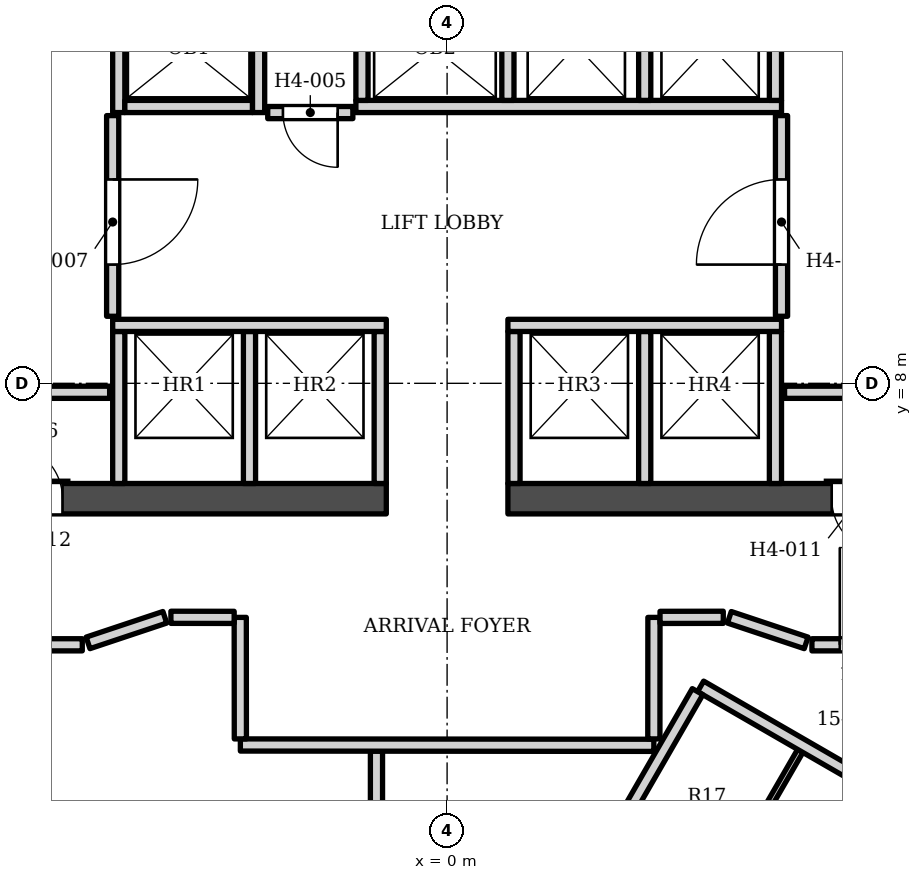
"""IFC4 building model, lengths in metres.
Left out: names, types, materials, properties, quantities, classifications, styles, units other than length and angle.
Written with IfcOpenShell. Run it as: python <this file> out.ifc"""

import sys

from ifc_helpers import new_model, si_unit, direction, frame, frame_2d, origin, place, context, subcontext, project, spatial, rectangle, extrude, element, fill, save


model = new_model("IFC4")
c1 = context("Model", 3, precision=1e-05, world=origin(), true_north=direction((0.0, 1.0)))
c2 = subcontext(c1, "Body", "Model", "MODEL_VIEW")
j1 = project(units=[si_unit("LENGTHUNIT", "METRE"), si_unit("PLANEANGLEUNIT", "RADIAN")], contexts=[c1])
p1 = place(None, origin())
s1 = spatial("IfcSite", under=j1, at=p1, CompositionType="ELEMENT")
p2 = place(p1, origin())
s2 = spatial("IfcBuilding", under=s1, at=p2, CompositionType="ELEMENT")
p3 = place(p2, frame((0.0, 0.0, 76.6)))
s3 = spatial("IfcBuildingStorey", under=s2, at=p3, CompositionType="ELEMENT", Elevation=76.6)
p4 = place(p3, frame((-8.05, 6.103, 0.0), z_axis=(0.0, 0.0, 1.0), x_axis=(1.0, 0.0, 0.0)))
e1 = element("IfcWall", 1, at=p4, inside=s3, PredefinedType="SHEAR", context=c2, shape_type="SweptSolid", body=[
    extrude(rectangle(XDim=7.05, YDim=0.5, at=frame_2d((3.525, 0.0))), origin(), (0.0, 0.0, 1.0), 3.4),
])
p5 = place(p4, frame((0.825, 0.0, 0.0)))
e2 = element("IfcOpeningElement", 2, at=p5, cuts=e1, PredefinedType="OPENING", context=c2, shape_type="SweptSolid", body=[
    extrude(rectangle(XDim=0.9, YDim=2.1, at=frame_2d((0.45, 1.05))), frame((0.0, 0.26, 0.0), z_axis=(0.0, -1.0, 0.0), x_axis=(1.0, 0.0, 0.0)), (0.0, 0.0, 1.0), 0.52),
])
p6 = place(p3, frame((1.0, 6.103, 0.0), z_axis=(0.0, 0.0, 1.0), x_axis=(1.0, 0.0, 0.0)))
e3 = element("IfcWall", 3, at=p6, inside=s3, PredefinedType="SHEAR", context=c2, shape_type="SweptSolid", body=[
    extrude(rectangle(XDim=7.05, YDim=0.5, at=frame_2d((3.525, 0.0))), origin(), (0.0, 0.0, 1.0), 3.4),
])
p7 = place(p6, frame((5.325, 0.0, 0.0)))
e4 = element("IfcOpeningElement", 4, at=p7, cuts=e3, PredefinedType="OPENING", context=c2, shape_type="SweptSolid", body=[
    extrude(rectangle(XDim=0.9, YDim=2.1, at=frame_2d((0.45, 1.05))), frame((0.0, 0.26, 0.0), z_axis=(0.0, -1.0, 0.0), x_axis=(1.0, 0.0, 0.0)), (0.0, 0.0, 1.0), 0.52),
])
for number, where, z_axis, x_axis in (
    (5, (-5.4, 6.353, 0.0), (0.0, 0.0, 1.0), (0.0, 1.0, 0.0)),
    (6, (-3.25, 6.353, 0.0), (0.0, 0.0, 1.0), (0.0, 1.0, 0.0)),
    (7, (-1.1, 6.353, 0.0), (0.0, 0.0, 1.0), (0.0, 1.0, 0.0)),
    (8, (1.1, 6.353, 0.0), (0.0, 0.0, 1.0), (0.0, 1.0, 0.0)),
    (9, (3.25, 6.353, 0.0), (0.0, 0.0, 1.0), (0.0, 1.0, 0.0)),
    (10, (5.4, 6.353, 0.0), (0.0, 0.0, 1.0), (0.0, 1.0, 0.0)),
    (11, (-8.05, 7.853, 0.0), (0.0, 0.0, 1.0), (1.0, 0.0, 0.0)),
    (12, (5.55, 7.853, 0.0), (0.0, 0.0, 1.0), (1.0, 0.0, 0.0)),
):
    element("IfcWall", number, at=place(p3, frame(where, z_axis=z_axis, x_axis=x_axis)), inside=s3, PredefinedType="SOLIDWALL", context=c2, shape_type="SweptSolid", body=[
        extrude(rectangle(XDim=2.5, YDim=0.2, at=frame_2d((1.25, 0.0))), origin(), (0.0, 0.0, 1.0), 3.23),
    ])
for number, where, z_axis, x_axis in (
    (13, (-5.5, 8.953, 0.0), (0.0, 0.0, 1.0), (1.0, 0.0, 0.0)),
    (14, (1.0, 8.953, 0.0), (0.0, 0.0, 1.0), (1.0, 0.0, 0.0)),
):
    element("IfcWall", number, at=place(p3, frame(where, z_axis=z_axis, x_axis=x_axis)), inside=s3, PredefinedType="SOLIDWALL", context=c2, shape_type="SweptSolid", body=[
        extrude(rectangle(XDim=4.5, YDim=0.2, at=frame_2d((2.25, 0.0))), origin(), (0.0, 0.0, 1.0), 3.23),
    ])
p8 = place(p3, frame((-5.5, 9.103, 0.0), z_axis=(0.0, 0.0, 1.0), x_axis=(0.0, 1.0, 0.0)))
e15 = element("IfcWall", 15, at=p8, inside=s3, PredefinedType="SOLIDWALL", context=c2, shape_type="SweptSolid", body=[
    extrude(rectangle(XDim=3.3, YDim=0.2, at=frame_2d((1.65, 0.0))), origin(), (0.0, 0.0, 1.0), 3.23),
])
p9 = place(p8, frame((0.85, 0.0, 0.0)))
e16 = element("IfcOpeningElement", 16, at=p9, cuts=e15, PredefinedType="OPENING", context=c2, shape_type="SweptSolid", body=[
    extrude(rectangle(XDim=1.4, YDim=2.1, at=frame_2d((0.7, 1.05))), frame((0.0, 0.11, 0.0), z_axis=(0.0, -1.0, 0.0), x_axis=(1.0, 0.0, 0.0)), (0.0, 0.0, 1.0), 0.22),
])
p10 = place(p3, frame((5.5, 9.103, 0.0), z_axis=(0.0, 0.0, 1.0), x_axis=(0.0, 1.0, 0.0)))
e17 = element("IfcWall", 17, at=p10, inside=s3, PredefinedType="SOLIDWALL", context=c2, shape_type="SweptSolid", body=[
    extrude(rectangle(XDim=3.3, YDim=0.2, at=frame_2d((1.65, 0.0))), origin(), (0.0, 0.0, 1.0), 3.23),
])
p11 = place(p10, frame((0.85, 0.0, 0.0)))
e18 = element("IfcOpeningElement", 18, at=p11, cuts=e17, PredefinedType="OPENING", context=c2, shape_type="SweptSolid", body=[
    extrude(rectangle(XDim=1.4, YDim=2.1, at=frame_2d((0.7, 1.05))), frame((0.0, 0.11, 0.0), z_axis=(0.0, -1.0, 0.0), x_axis=(1.0, 0.0, 0.0)), (0.0, 0.0, 1.0), 0.22),
])
p12 = place(p3, frame((-2.95, 12.453, 0.0), z_axis=(0.0, 0.0, 1.0), x_axis=(1.0, 0.0, 0.0)))
e19 = element("IfcWall", 19, at=p12, inside=s3, PredefinedType="SOLIDWALL", context=c2, shape_type="SweptSolid", body=[
    extrude(rectangle(XDim=1.4, YDim=0.2, at=frame_2d((0.7, 0.0))), origin(), (0.0, 0.0, 1.0), 3.23),
])
p13 = place(p12, frame((0.25, 0.0, 0.0)))
e20 = element("IfcOpeningElement", 20, at=p13, cuts=e19, PredefinedType="OPENING", context=c2, shape_type="SweptSolid", body=[
    extrude(rectangle(XDim=0.9, YDim=2.1, at=frame_2d((0.45, 1.05))), frame((0.0, 0.11, 0.0), z_axis=(0.0, -1.0, 0.0), x_axis=(1.0, 0.0, 0.0)), (0.0, 0.0, 1.0), 0.22),
])
p14 = place(p3, frame((-5.4, 12.453, 0.0), z_axis=(0.0, 0.0, 1.0), x_axis=(0.0, 1.0, 0.0)))
e21 = element("IfcWall", 21, at=p14, inside=s3, PredefinedType="SOLIDWALL", context=c2, shape_type="SweptSolid", body=[
    extrude(rectangle(XDim=3.0, YDim=0.2, at=frame_2d((1.5, 0.0))), origin(), (0.0, 0.0, 1.0), 3.23),
])
p15 = place(p3, frame((-5.3, 12.552, 0.0), z_axis=(0.0, 0.0, 1.0), x_axis=(1.0, 0.0, 0.0)))
e22 = element("IfcWall", 22, at=p15, inside=s3, PredefinedType="SOLIDWALL", context=c2, shape_type="SweptSolid", body=[
    extrude(rectangle(XDim=2.1, YDim=0.2, at=frame_2d((1.05, 0.0))), origin(), (0.0, 0.0, 1.0), 3.23),
])
p16 = place(p3, frame((-3.1, 12.453, 0.0), z_axis=(0.0, 0.0, 1.0), x_axis=(0.0, 1.0, 0.0)))
e23 = element("IfcWall", 23, at=p16, inside=s3, PredefinedType="SOLIDWALL", context=c2, shape_type="SweptSolid", body=[
    extrude(rectangle(XDim=3.0, YDim=0.2, at=frame_2d((1.5, 0.0))), origin(), (0.0, 0.0, 1.0), 3.23),
])
p17 = place(p3, frame((-1.5, 12.552, 0.0), z_axis=(0.0, 0.0, 1.0), x_axis=(1.0, 0.0, 0.0)))
e24 = element("IfcWall", 24, at=p17, inside=s3, PredefinedType="SOLIDWALL", context=c2, shape_type="SweptSolid", body=[
    extrude(rectangle(XDim=7.0, YDim=0.2, at=frame_2d((3.5, 0.0))), origin(), (0.0, 0.0, 1.0), 3.23),
])
for number, where, z_axis, x_axis in (
    (25, (-1.4, 12.653, 0.0), (0.0, 0.0, 1.0), (0.0, 1.0, 0.0)),
    (26, (1.0, 12.653, 0.0), (0.0, 0.0, 1.0), (0.0, 1.0, 0.0)),
    (27, (3.25, 12.653, 0.0), (0.0, 0.0, 1.0), (0.0, 1.0, 0.0)),
):
    element("IfcWall", number, at=place(p3, frame(where, z_axis=z_axis, x_axis=x_axis)), inside=s3, PredefinedType="SOLIDWALL", context=c2, shape_type="SweptSolid", body=[
        extrude(rectangle(XDim=2.6, YDim=0.2, at=frame_2d((1.3, 0.0))), origin(), (0.0, 0.0, 1.0), 3.23),
    ])
p18 = place(p3, frame((5.4, 12.653, 0.0), z_axis=(0.0, 0.0, 1.0), x_axis=(0.0, 1.0, 0.0)))
e28 = element("IfcWall", 28, at=p18, inside=s3, PredefinedType="SOLIDWALL", context=c2, shape_type="SweptSolid", body=[
    extrude(rectangle(XDim=1.6, YDim=0.2, at=frame_2d((0.8, 0.0))), origin(), (0.0, 0.0, 1.0), 3.23),
])
p19 = place(p3, frame((-1.162, -3.791, 0.0), z_axis=(0.0, 0.0, 1.0), x_axis=(0.0, 1.0, 0.0)))
e29 = element("IfcWall", 29, at=p19, inside=s3, PredefinedType="PARTITIONING", context=c2, shape_type="SweptSolid", body=[
    extrude(rectangle(XDim=5.743, YDim=0.2, at=frame_2d((2.872, 0.0))), origin(), (0.0, 0.0, 1.0), 3.23),
])
p20 = place(p3, frame((4.382, -0.511, 0.0), z_axis=(0.0, 0.0, 1.0), x_axis=(0.500536077286, 0.865715678115, 0.0)))
e30 = element("IfcWall", 30, at=p20, inside=s3, PredefinedType="PARTITIONING", context=c2, shape_type="SweptSolid", body=[
    extrude(rectangle(XDim=2.848, YDim=0.1, at=frame_2d((1.424, 0.0))), origin(), (0.0, 0.0, 1.0), 2.242),
])
p21 = place(p3, frame((4.169, 3.016, 0.0), z_axis=(0.0, 0.0, 1.0), x_axis=(0.866018092707, -0.500012662943, 0.0)))
e31 = element("IfcWall", 31, at=p21, inside=s3, PredefinedType="PARTITIONING", context=c2, shape_type="SweptSolid", body=[
    extrude(rectangle(XDim=5.85, YDim=0.2, at=frame_2d((2.925, 0.0))), origin(), (0.0, 0.0, 1.0), 2.242),
])
p22 = place(p3, frame((-3.4, 2.052, 0.0), z_axis=(0.0, 0.0, 1.0), x_axis=(0.999999659082, -0.000825733904, 0.0)))
e32 = element("IfcWall", 32, at=p22, inside=s3, PredefinedType="PARTITIONING", context=c2, shape_type="SweptSolid", body=[
    extrude(rectangle(XDim=6.8, YDim=0.2, at=frame_2d((3.4, 0.0))), origin(), (0.0, 0.0, 1.0), 2.242),
])
p23 = place(p3, frame((0.859, -17.822, 0.0), z_axis=(0.0, 0.0, 1.0), x_axis=(0.500002395808, 0.866024020559, 0.0)))
e33 = element("IfcWall", 33, at=p23, inside=s3, PredefinedType="PARTITIONING", context=c2, shape_type="SweptSolid", body=[
    extrude(rectangle(XDim=23.0, YDim=0.2, at=frame_2d((11.5, 0.0))), origin(), (0.0, 0.0, 1.0), 2.242),
])
p24 = place(p23, frame((0.7, 0.0, 0.0)))
e34 = element("IfcOpeningElement", 34, at=p24, cuts=e33, PredefinedType="OPENING", context=c2, shape_type="SweptSolid", body=[
    extrude(rectangle(XDim=1.0, YDim=2.1, at=frame_2d((0.5, 1.05))), frame((0.0, 0.11, 0.0), z_axis=(0.0, -1.0, 0.0), x_axis=(1.0, 0.0, 0.0)), (0.0, 0.0, 1.0), 0.22),
])
p25 = place(p23, frame((3.1, 0.0, 0.0)))
e35 = element("IfcOpeningElement", 35, at=p25, cuts=e33, PredefinedType="OPENING", context=c2, shape_type="SweptSolid", body=[
    extrude(rectangle(XDim=1.0, YDim=2.1, at=frame_2d((0.5, 1.05))), frame((0.0, 0.11, 0.0), z_axis=(0.0, -1.0, 0.0), x_axis=(1.0, 0.0, 0.0)), (0.0, 0.0, 1.0), 0.22),
])
p26 = place(p23, frame((9.7, 0.0, 0.0)))
e36 = element("IfcOpeningElement", 36, at=p26, cuts=e33, PredefinedType="OPENING", context=c2, shape_type="SweptSolid", body=[
    extrude(rectangle(XDim=1.0, YDim=2.1, at=frame_2d((0.5, 1.05))), frame((0.0, 0.11, 0.0), z_axis=(0.0, -1.0, 0.0), x_axis=(1.0, 0.0, 0.0)), (0.0, 0.0, 1.0), 0.22),
])
p27 = place(p23, frame((12.1, 0.0, 0.0)))
e37 = element("IfcOpeningElement", 37, at=p27, cuts=e33, PredefinedType="OPENING", context=c2, shape_type="SweptSolid", body=[
    extrude(rectangle(XDim=1.0, YDim=2.1, at=frame_2d((0.5, 1.05))), frame((0.0, 0.11, 0.0), z_axis=(0.0, -1.0, 0.0), x_axis=(1.0, 0.0, 0.0)), (0.0, 0.0, 1.0), 0.22),
])
p28 = place(p23, frame((16.6, 0.0, 0.0)))
e38 = element("IfcOpeningElement", 38, at=p28, cuts=e33, PredefinedType="OPENING", context=c2, shape_type="SweptSolid", body=[
    extrude(rectangle(XDim=1.0, YDim=2.1, at=frame_2d((0.5, 1.05))), frame((0.0, 0.11, 0.0), z_axis=(0.0, -1.0, 0.0), x_axis=(1.0, 0.0, 0.0)), (0.0, 0.0, 1.0), 0.22),
])
for number, where, z_axis, x_axis in (
    (39, (-3.402, 4.151, 0.0), (0.0, 0.0, 1.0), (0.001, -1.0, 0.0)),
    (40, (3.4, 2.152, 0.0), (0.0, 0.0, 1.0), (0.001, 1.0, 0.0)),
):
    element("IfcWall", number, at=place(p3, frame(where, z_axis=z_axis, x_axis=x_axis)), inside=s3, PredefinedType="PARTITIONING", context=c2, shape_type="SweptSolid", body=[
        extrude(rectangle(XDim=1.998, YDim=0.2, at=frame_2d((0.999, 0.0))), origin(), (0.0, 0.0, 1.0), 3.23),
    ])
p29 = place(p3, frame((2.696, 0.461, 0.0), z_axis=(0.0, 0.0, 1.0), x_axis=(0.499502432077, 0.866312484239, 0.0)))
e41 = element("IfcWall", 41, at=p29, inside=s3, PredefinedType="PARTITIONING", context=c2, shape_type="SweptSolid", body=[
    extrude(rectangle(XDim=2.85, YDim=0.2, at=frame_2d((1.425, 0.0))), origin(), (0.0, 0.0, 1.0), 3.23),
])
p30 = place(p3, frame((-11.276, 3.7, 0.0), z_axis=(0.0, 0.0, 1.0), x_axis=(1.0, 0.0, 0.0)))
e42 = element("IfcWall", 42, at=p30, inside=s3, PredefinedType="PARTITIONING", context=c2, shape_type="SweptSolid", body=[
    extrude(rectangle(XDim=5.276, YDim=0.2, at=frame_2d((2.638, 0.0))), origin(), (0.0, 0.0, 1.0), 2.242),
])
p31 = place(p3, frame((6.0, 3.7, 0.0), z_axis=(0.0, 0.0, 1.0), x_axis=(1.0, 0.0, 0.0)))
e43 = element("IfcWall", 43, at=p31, inside=s3, PredefinedType="PARTITIONING", context=c2, shape_type="SweptSolid", body=[
    extrude(rectangle(XDim=5.319, YDim=0.2, at=frame_2d((2.659, 0.0))), origin(), (0.0, 0.0, 1.0), 2.242),
])
p32 = place(p31, frame((0.459, 0.0, 0.0)))
e44 = element("IfcOpeningElement", 44, at=p32, cuts=e43, PredefinedType="OPENING", context=c2, shape_type="SweptSolid", body=[
    extrude(rectangle(XDim=1.6, YDim=2.1, at=frame_2d((0.8, 1.05))), frame((0.0, 0.11, 0.0), z_axis=(0.0, -1.0, 0.0), x_axis=(1.0, 0.0, 0.0)), (0.0, 0.0, 1.0), 0.22),
])
p33 = place(p3, frame((-5.905, 3.731, 0.0), z_axis=(0.0, 0.0, 1.0), x_axis=(0.948683298051, 0.316227766017, 0.0)))
e45 = element("IfcWall", 45, at=p33, inside=s3, PredefinedType="PARTITIONING", context=c2, shape_type="SweptSolid", body=[
    extrude(rectangle(XDim=1.331, YDim=0.2, at=frame_2d((0.666, 0.0))), origin(), (0.0, 0.0, 1.0), 2.242),
])
for number, where, z_axis, x_axis in (
    (46, (-4.542, 4.152, 0.0), (0.0, 0.0, 1.0), (1.0, -0.001, 0.0)),
    (47, (3.502, 4.151, 0.0), (0.0, 0.0, 1.0), (1.0, 0.001, 0.0)),
):
    element("IfcWall", number, at=place(p3, frame(where, z_axis=z_axis, x_axis=x_axis)), inside=s3, PredefinedType="PARTITIONING", context=c2, shape_type="SweptSolid", body=[
        extrude(rectangle(XDim=1.04, YDim=0.2, at=frame_2d((0.52, 0.0))), origin(), (0.0, 0.0, 1.0), 3.23),
    ])
p34 = place(p3, frame((4.642, 4.152, 0.0), z_axis=(0.0, 0.0, 1.0), x_axis=(0.948683298051, -0.316227766017, 0.0)))
e48 = element("IfcWall", 48, at=p34, inside=s3, PredefinedType="PARTITIONING", context=c2, shape_type="SweptSolid", body=[
    extrude(rectangle(XDim=1.331, YDim=0.2, at=frame_2d((0.666, 0.0))), origin(), (0.0, 0.0, 1.0), 2.242),
])
p35 = place(p13, origin())
e49 = element("IfcDoor", 49, at=p35, inside=s3, OperationType="SINGLE_SWING_RIGHT", PredefinedType="DOOR", context=c2, shape_type="SweptSolid", body=[
    extrude(rectangle(XDim=0.9, YDim=2.1, at=frame_2d((0.45, 1.05))), frame((0.0, 0.025, 0.0), z_axis=(0.0, -1.0, 0.0), x_axis=(1.0, 0.0, 0.0)), (0.0, 0.0, 1.0), 0.05),
])
fill(e20, e49)
p36 = place(p9, origin())
e50 = element("IfcDoor", 50, at=p36, inside=s3, OperationType="SINGLE_SWING_RIGHT", PredefinedType="DOOR", context=c2, shape_type="SweptSolid", body=[
    extrude(rectangle(XDim=1.4, YDim=2.1, at=frame_2d((0.7, 1.05))), frame((0.0, 0.025, 0.0), z_axis=(0.0, -1.0, 0.0), x_axis=(1.0, 0.0, 0.0)), (0.0, 0.0, 1.0), 0.05),
])
fill(e16, e50)
p37 = place(p11, origin())
e51 = element("IfcDoor", 51, at=p37, inside=s3, OperationType="SINGLE_SWING_LEFT", PredefinedType="DOOR", context=c2, shape_type="SweptSolid", body=[
    extrude(rectangle(XDim=1.4, YDim=2.1, at=frame_2d((0.7, 1.05))), frame((0.0, 0.025, 0.0), z_axis=(0.0, -1.0, 0.0), x_axis=(1.0, 0.0, 0.0)), (0.0, 0.0, 1.0), 0.05),
])
fill(e18, e51)
p38 = place(p5, origin())
e52 = element("IfcDoor", 52, at=p38, inside=s3, OperationType="SINGLE_SWING_LEFT", PredefinedType="DOOR", context=c2, shape_type="SweptSolid", body=[
    extrude(rectangle(XDim=0.9, YDim=2.1, at=frame_2d((0.45, 1.05))), frame((0.0, 0.025, 0.0), z_axis=(0.0, -1.0, 0.0), x_axis=(1.0, 0.0, 0.0)), (0.0, 0.0, 1.0), 0.05),
])
fill(e2, e52)
p39 = place(p7, origin())
e53 = element("IfcDoor", 53, at=p39, inside=s3, OperationType="SINGLE_SWING_RIGHT", PredefinedType="DOOR", context=c2, shape_type="SweptSolid", body=[
    extrude(rectangle(XDim=0.9, YDim=2.1, at=frame_2d((0.45, 1.05))), frame((0.0, 0.025, 0.0), z_axis=(0.0, -1.0, 0.0), x_axis=(1.0, 0.0, 0.0)), (0.0, 0.0, 1.0), 0.05),
])
fill(e4, e53)
p40 = place(p32, origin())
e54 = element("IfcDoor", 54, at=p40, inside=s3, OperationType="DOUBLE_DOOR_SINGLE_SWING", PredefinedType="DOOR", context=c2, shape_type="SweptSolid", body=[
    extrude(rectangle(XDim=1.6, YDim=2.1, at=frame_2d((0.8, 1.05))), frame((0.0, 0.025, 0.0), z_axis=(0.0, -1.0, 0.0), x_axis=(1.0, 0.0, 0.0)), (0.0, 0.0, 1.0), 0.05),
])
fill(e44, e54)
save(model, sys.argv[1])
